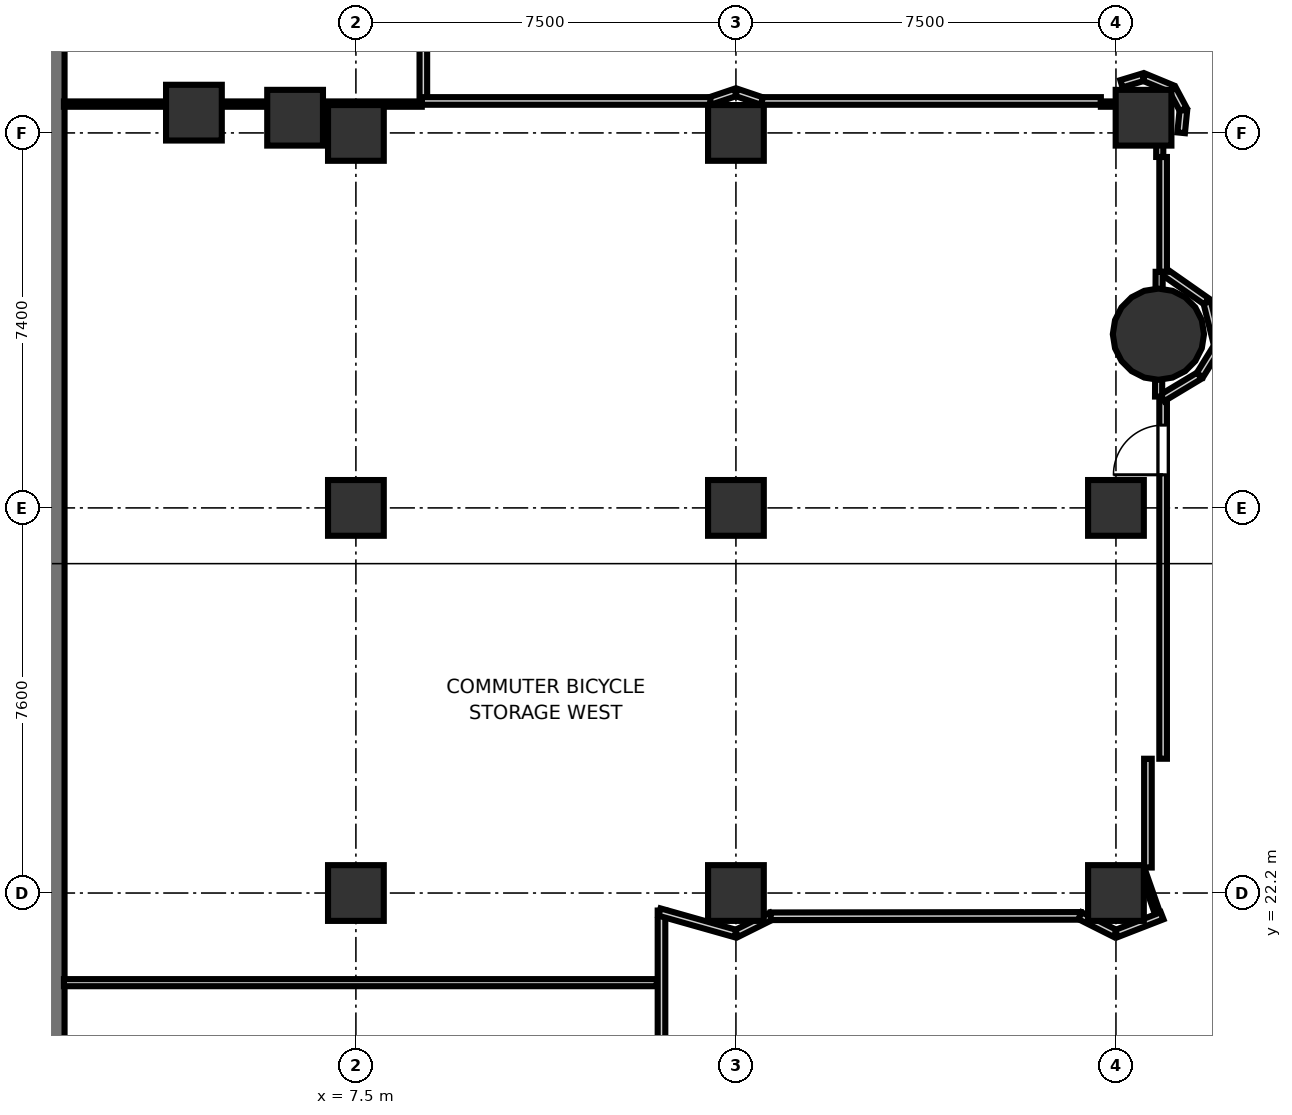
"""IFC4 building model, lengths in metres.
Left out: names, types, materials, properties, quantities, classifications, styles, units other than length and angle.
Written with IfcOpenShell. Run it as: python <this file> out.ifc"""

import sys

from ifc_helpers import new_model, si_unit, direction, frame, frame_2d, origin, origin_2d, place, context, subcontext, project, spatial, rectangle, hollow_circle, extrude, element, fill, save


model = new_model("IFC4")
c1 = context("Model", 3, precision=1e-05, world=origin(), true_north=direction((0.0, 1.0)))
c2 = subcontext(c1, "Body", "Model", "MODEL_VIEW")
j1 = project(units=[si_unit("LENGTHUNIT", "METRE"), si_unit("PLANEANGLEUNIT", "RADIAN")], contexts=[c1])
p1 = place(None, origin())
s1 = spatial("IfcSite", under=j1, at=p1, CompositionType="ELEMENT")
p2 = place(p1, origin())
s2 = spatial("IfcBuilding", under=s1, at=p2, CompositionType="ELEMENT")
p3 = place(p2, frame((0.0, 0.0, -5.6)))
s3 = spatial("IfcBuildingStorey", under=s2, at=p3, CompositionType="ELEMENT", Elevation=-5.6)
p4 = place(p3, frame((23.338, 33.228, 0.0), z_axis=(0.0, 0.0, 1.0), x_axis=(1.0, 0.0, 0.0)))
e1 = element("IfcColumn", 1, at=p4, inside=s3, PredefinedType="COLUMN", context=c2, shape_type="SweptSolid", body=[
    extrude(hollow_circle(Radius=0.9, WallThickness=0.045, at=origin_2d()), origin(), (0.0, 0.0, 1.0), 5.6),
])
for number, where, z_axis, x_axis in (
    (2, (6.3, 37.5, 0.0), (0.0, 0.0, 1.0), (1.0, 0.0, 0.0)),
    (3, (23.045, 37.5, 0.0), (0.0, 0.0, 1.0), (1.0, 0.0, 0.0)),
    (4, (7.5, 22.2, 0.0), (0.0, 0.0, 1.0), (1.0, 0.0, 0.0)),
    (5, (7.5, 29.8, 0.0), (0.0, 0.0, 1.0), (1.0, 0.0, 0.0)),
    (6, (7.5, 37.2, 0.0), (0.0, 0.0, 1.0), (1.0, 0.0, 0.0)),
    (7, (15.0, 22.2, 0.0), (0.0, 0.0, 1.0), (1.0, 0.0, 0.0)),
    (8, (15.0, 29.8, 0.0), (0.0, 0.0, 1.0), (1.0, 0.0, 0.0)),
    (9, (15.0, 37.2, 0.0), (0.0, 0.0, 1.0), (1.0, 0.0, 0.0)),
    (10, (22.5, 22.2, 0.0), (0.0, 0.0, 1.0), (1.0, 0.0, 0.0)),
    (11, (22.5, 29.8, 0.0), (0.0, 0.0, 1.0), (1.0, 0.0, 0.0)),
    (12, (4.303, 37.6, 0.0), (0.0, 0.0, 1.0), (1.0, 0.0, 0.0)),
):
    element("IfcColumn", number, at=place(p3, frame(where, z_axis=z_axis, x_axis=x_axis)), inside=s3, PredefinedType="COLUMN", context=c2, shape_type="SweptSolid", body=[
        extrude(rectangle(XDim=1.1, YDim=1.1, at=origin_2d()), origin(), (0.0, 0.0, 1.0), 5.6),
    ])
p5 = place(p3, frame((1.5, 46.5, 0.0), z_axis=(0.0, 0.0, 1.0), x_axis=(0.0, -1.0, 0.0)))
e13 = element("IfcWall", 13, at=p5, inside=s3, PredefinedType="SOLIDWALL", context=c2, shape_type="SweptSolid", body=[
    extrude(rectangle(XDim=41.0, YDim=0.5, at=frame_2d((20.5, 0.0))), origin(), (0.0, 0.0, 1.0), 5.3),
])
p6 = place(p3, frame((8.831, 37.8, 0.0), z_axis=(0.0, 0.0, 1.0), x_axis=(0.0, 1.0, 0.0)))
e14 = element("IfcWall", 14, at=p6, inside=s3, PredefinedType="PARTITIONING", context=c2, shape_type="SweptSolid", body=[
    extrude(rectangle(XDim=3.16, YDim=0.15, at=frame_2d((1.58, 0.0))), origin(), (0.0, 0.0, 1.0), 4.62),
])
p7 = place(p3, frame((13.531, 18.55, 0.0), z_axis=(0.0, 0.0, 1.0), x_axis=(0.0, 1.0, 0.0)))
e15 = element("IfcWall", 15, at=p7, inside=s3, PredefinedType="PARTITIONING", context=c2, shape_type="SweptSolid", body=[
    extrude(rectangle(XDim=3.304, YDim=0.15, at=frame_2d((1.652, 0.0))), origin(), (0.0, 0.0, 1.0), 4.62),
])
p8 = place(p3, frame((13.492, 21.824, 0.0), z_axis=(0.0, 0.0, 1.0), x_axis=(0.962241655343, -0.272196614093, 0.0)))
e16 = element("IfcWall", 16, at=p8, inside=s3, PredefinedType="PARTITIONING", context=c2, shape_type="SweptSolid", body=[
    extrude(rectangle(XDim=1.559, YDim=0.15, at=frame_2d((0.779, 0.0))), origin(), (0.0, 0.0, 1.0), 4.62),
])
p9 = place(p3, frame((15.014, 21.402, 0.0), z_axis=(0.0, 0.0, 1.0), x_axis=(0.895126158245, 0.44581292133, 0.0)))
e17 = element("IfcWall", 17, at=p9, inside=s3, PredefinedType="PARTITIONING", context=c2, shape_type="SweptSolid", body=[
    extrude(rectangle(XDim=0.767, YDim=0.15, at=frame_2d((0.384, 0.0))), origin(), (0.0, 0.0, 1.0), 4.62),
])
p10 = place(p3, frame((15.687, 21.741, 0.0), z_axis=(0.0, 0.0, 1.0), x_axis=(0.999999234634, 0.001237227661, 0.0)))
e18 = element("IfcWall", 18, at=p10, inside=s3, PredefinedType="PARTITIONING", context=c2, shape_type="SweptSolid", body=[
    extrude(rectangle(XDim=6.117, YDim=0.15, at=frame_2d((3.059, 0.0))), origin(), (0.0, 0.0, 1.0), 4.62),
])
p11 = place(p3, frame((21.79, 21.752, 0.0), z_axis=(0.0, 0.0, 1.0), x_axis=(0.893485033775, -0.449092968572, 0.0)))
e19 = element("IfcWall", 19, at=p11, inside=s3, PredefinedType="PARTITIONING", context=c2, shape_type="SweptSolid", body=[
    extrude(rectangle(XDim=0.779, YDim=0.15, at=frame_2d((0.39, 0.0))), origin(), (0.0, 0.0, 1.0), 4.62),
])
p12 = place(p3, frame((22.511, 21.401, 0.0), z_axis=(0.0, 0.0, 1.0), x_axis=(0.93195721425, 0.362568270547, 0.0)))
e20 = element("IfcWall", 20, at=p12, inside=s3, PredefinedType="PARTITIONING", context=c2, shape_type="SweptSolid", body=[
    extrude(rectangle(XDim=0.966, YDim=0.15, at=frame_2d((0.483, 0.0))), origin(), (0.0, 0.0, 1.0), 4.62),
])
p13 = place(p3, frame((23.131, 22.703, 0.0), z_axis=(0.0, 0.0, 1.0), x_axis=(0.0, 1.0, 0.0)))
e21 = element("IfcWall", 21, at=p13, inside=s3, PredefinedType="PARTITIONING", context=c2, shape_type="SweptSolid", body=[
    extrude(rectangle(XDim=2.147, YDim=0.15, at=frame_2d((1.073, 0.0))), origin(), (0.0, 0.0, 1.0), 4.62),
])
p14 = place(p3, frame((23.431, 24.85, 0.0), z_axis=(0.0, 0.0, 1.0), x_axis=(0.0, 1.0, 0.0)))
e22 = element("IfcWall", 22, at=p14, inside=s3, PredefinedType="PARTITIONING", context=c2, shape_type="SweptSolid", body=[
    extrude(rectangle(XDim=7.147, YDim=0.15, at=frame_2d((3.574, 0.0))), origin(), (0.0, 0.0, 1.0), 4.62),
])
p15 = place(p14, frame((5.604, 0.0, 0.0)))
e23 = element("IfcOpeningElement", 23, at=p15, cuts=e22, PredefinedType="OPENING", context=c2, shape_type="SweptSolid", body=[
    extrude(rectangle(XDim=0.98, YDim=2.1, at=frame_2d((0.49, 1.05))), frame((0.0, 0.085, 0.0), z_axis=(0.0, -1.0, 0.0), x_axis=(1.0, 0.0, 0.0)), (0.0, 0.0, 1.0), 0.17),
])
p16 = place(p3, frame((23.416, 31.971, 0.0), z_axis=(0.0, 0.0, 1.0), x_axis=(0.857113289669, 0.51512795369, 0.0)))
e24 = element("IfcWall", 24, at=p16, inside=s3, PredefinedType="PARTITIONING", context=c2, shape_type="SweptSolid", body=[
    extrude(rectangle(XDim=0.852, YDim=0.15, at=frame_2d((0.426, 0.0))), origin(), (0.0, 0.0, 1.0), 4.62),
])
p17 = place(p3, frame((24.156, 32.42, 0.0), z_axis=(0.0, 0.0, 1.0), x_axis=(0.527189094598, 0.849747997077, 0.0)))
e25 = element("IfcWall", 25, at=p17, inside=s3, PredefinedType="PARTITIONING", context=c2, shape_type="SweptSolid", body=[
    extrude(rectangle(XDim=0.665, YDim=0.15, at=frame_2d((0.332, 0.0))), origin(), (0.0, 0.0, 1.0), 4.62),
])
p18 = place(p3, frame((24.51, 33.008, 0.0), z_axis=(0.0, 0.0, 1.0), x_axis=(-0.241288371534, 0.970453461925, 0.0)))
e26 = element("IfcWall", 26, at=p18, inside=s3, PredefinedType="PARTITIONING", context=c2, shape_type="SweptSolid", body=[
    extrude(rectangle(XDim=0.875, YDim=0.15, at=frame_2d((0.438, 0.0))), origin(), (0.0, 0.0, 1.0), 4.62),
])
p19 = place(p3, frame((24.287, 33.875, 0.0), z_axis=(0.0, 0.0, 1.0), x_axis=(-0.819199496394, 0.573508661755, 0.0)))
e27 = element("IfcWall", 27, at=p19, inside=s3, PredefinedType="PARTITIONING", context=c2, shape_type="SweptSolid", body=[
    extrude(rectangle(XDim=1.061, YDim=0.15, at=frame_2d((0.531, 0.0))), origin(), (0.0, 0.0, 1.0), 4.62),
])
p20 = place(p3, frame((23.431, 34.459, 0.0), z_axis=(0.0, 0.0, 1.0), x_axis=(0.0, 1.0, 0.0)))
e28 = element("IfcWall", 28, at=p20, inside=s3, PredefinedType="PARTITIONING", context=c2, shape_type="SweptSolid", body=[
    extrude(rectangle(XDim=2.266, YDim=0.15, at=frame_2d((1.133, 0.0))), origin(), (0.0, 0.0, 1.0), 4.62),
])
for number, where, z_axis, x_axis in (
    (29, (23.787, 37.202, 0.0), (0.0, 0.0, 1.0), (0.098, 0.995, 0.0)),
    (30, (23.827, 37.665, 0.0), (0.0, 0.0, 1.0), (-0.471, 0.882, 0.0)),
):
    element("IfcWall", number, at=place(p3, frame(where, z_axis=z_axis, x_axis=x_axis)), inside=s3, PredefinedType="PARTITIONING", context=c2, shape_type="SweptSolid", body=[
        extrude(rectangle(XDim=0.447, YDim=0.15, at=frame_2d((0.224, 0.0))), origin(), (0.0, 0.0, 1.0), 4.62),
    ])
p21 = place(p3, frame((23.601, 38.073, 0.0), z_axis=(0.0, 0.0, 1.0), x_axis=(-0.923835035561, 0.382790839847, 0.0)))
e31 = element("IfcWall", 31, at=p21, inside=s3, PredefinedType="PARTITIONING", context=c2, shape_type="SweptSolid", body=[
    extrude(rectangle(XDim=0.589, YDim=0.15, at=frame_2d((0.295, 0.0))), origin(), (0.0, 0.0, 1.0), 4.62),
])
p22 = place(p3, frame((23.036, 38.3, 0.0), z_axis=(0.0, 0.0, 1.0), x_axis=(-0.956858887343, -0.290553041134, 0.0)))
e32 = element("IfcWall", 32, at=p22, inside=s3, PredefinedType="PARTITIONING", context=c2, shape_type="SweptSolid", body=[
    extrude(rectangle(XDim=0.447, YDim=0.15, at=frame_2d((0.224, 0.0))), origin(), (0.0, 0.0, 1.0), 4.62),
])
p23 = place(p3, frame((22.202, 37.831, 0.0), z_axis=(0.0, 0.0, 1.0), x_axis=(-1.0, 0.0, 0.0)))
e33 = element("IfcWall", 33, at=p23, inside=s3, PredefinedType="PARTITIONING", context=c2, shape_type="SweptSolid", body=[
    extrude(rectangle(XDim=6.699, YDim=0.15, at=frame_2d((3.35, 0.0))), origin(), (0.0, 0.0, 1.0), 4.62),
])
for number, where, z_axis, x_axis in (
    (34, (15.513, 37.829, 0.0), (0.0, 0.0, 1.0), (-0.947, 0.321, 0.0)),
    (35, (14.99, 38.0, 0.0), (0.0, 0.0, 1.0), (-0.947, -0.321, 0.0)),
):
    element("IfcWall", number, at=place(p3, frame(where, z_axis=z_axis, x_axis=x_axis)), inside=s3, PredefinedType="PARTITIONING", context=c2, shape_type="SweptSolid", body=[
        extrude(rectangle(XDim=0.531, YDim=0.15, at=frame_2d((0.266, 0.0))), origin(), (0.0, 0.0, 1.0), 4.62),
    ])
p24 = place(p3, frame((14.497, 37.831, 0.0), z_axis=(0.0, 0.0, 1.0), x_axis=(-1.0, 0.0, 0.0)))
e36 = element("IfcWall", 36, at=p24, inside=s3, PredefinedType="PARTITIONING", context=c2, shape_type="SweptSolid", body=[
    extrude(rectangle(XDim=5.697, YDim=0.15, at=frame_2d((2.848, 0.0))), origin(), (0.0, 0.0, 1.0), 4.62),
])
p25 = place(p3, frame((23.369, 37.8, 0.0), z_axis=(0.0, 0.0, 1.0), x_axis=(-0.004769421111, -0.999988626246, 0.0)))
e37 = element("IfcWall", 37, at=p25, inside=s3, PredefinedType="PARTITIONING", context=c2, shape_type="SweptSolid", body=[
    extrude(rectangle(XDim=1.075, YDim=0.14, at=frame_2d((0.538, 0.0))), origin(), (0.0, 0.0, 1.0), 4.62),
])
p26 = place(p3, frame((23.353, 34.459, 0.0), z_axis=(0.0, 0.0, 1.0), x_axis=(-0.00476090617, -0.999988666822, 0.0)))
e38 = element("IfcWall", 38, at=p26, inside=s3, PredefinedType="PARTITIONING", context=c2, shape_type="SweptSolid", body=[
    extrude(rectangle(XDim=2.461, YDim=0.14, at=frame_2d((1.231, 0.0))), origin(), (0.0, 0.0, 1.0), 4.62),
])
p27 = place(p3, frame((23.009, 22.687, 0.0), z_axis=(0.0, 0.0, 1.0), x_axis=(0.329991013701, -0.943984073423, 0.0)))
e39 = element("IfcWall", 39, at=p27, inside=s3, PredefinedType="PARTITIONING", context=c2, shape_type="SweptSolid", body=[
    extrude(rectangle(XDim=0.908, YDim=0.105, at=frame_2d((0.454, 0.0))), origin(), (0.0, 0.0, 1.0), 4.478),
])
p28 = place(p3, frame((13.438, 20.431, 0.0), z_axis=(0.0, 0.0, 1.0), x_axis=(-1.0, 0.0, 0.0)))
e40 = element("IfcWall", 40, at=p28, inside=s3, PredefinedType="PARTITIONING", context=c2, shape_type="SweptSolid", body=[
    extrude(rectangle(XDim=11.7, YDim=0.14, at=frame_2d((5.85, 0.0))), origin(), (0.0, 0.0, 1.0), 4.62),
])
p29 = place(p3, frame((1.738, 37.769, 0.0), z_axis=(0.0, 0.0, 1.0), x_axis=(1.0, 0.0, 0.0)))
e41 = element("IfcWall", 41, at=p29, inside=s3, PredefinedType="PARTITIONING", context=c2, shape_type="SweptSolid", body=[
    extrude(rectangle(XDim=7.062, YDim=0.105, at=frame_2d((3.531, 0.0))), origin(), (0.0, 0.0, 1.0), 4.62),
])
p30 = place(p3, frame((22.202, 37.769, 0.0), z_axis=(0.0, 0.0, 1.0), x_axis=(1.0, 0.0, 0.0)))
e42 = element("IfcWall", 42, at=p30, inside=s3, PredefinedType="PARTITIONING", context=c2, shape_type="SweptSolid", body=[
    extrude(rectangle(XDim=1.198, YDim=0.105, at=frame_2d((0.599, 0.0))), origin(), (0.0, 0.0, 1.0), 4.62),
])
p31 = place(p15, origin())
e43 = element("IfcDoor", 43, at=p31, inside=s3, OperationType="SINGLE_SWING_LEFT", PredefinedType="DOOR", context=c2, shape_type="SweptSolid", body=[
    extrude(rectangle(XDim=0.98, YDim=2.1, at=frame_2d((0.49, 1.05))), frame((0.0, 0.025, 0.0), z_axis=(0.0, -1.0, 0.0), x_axis=(1.0, 0.0, 0.0)), (0.0, 0.0, 1.0), 0.05),
])
fill(e23, e43)
save(model, sys.argv[1])
